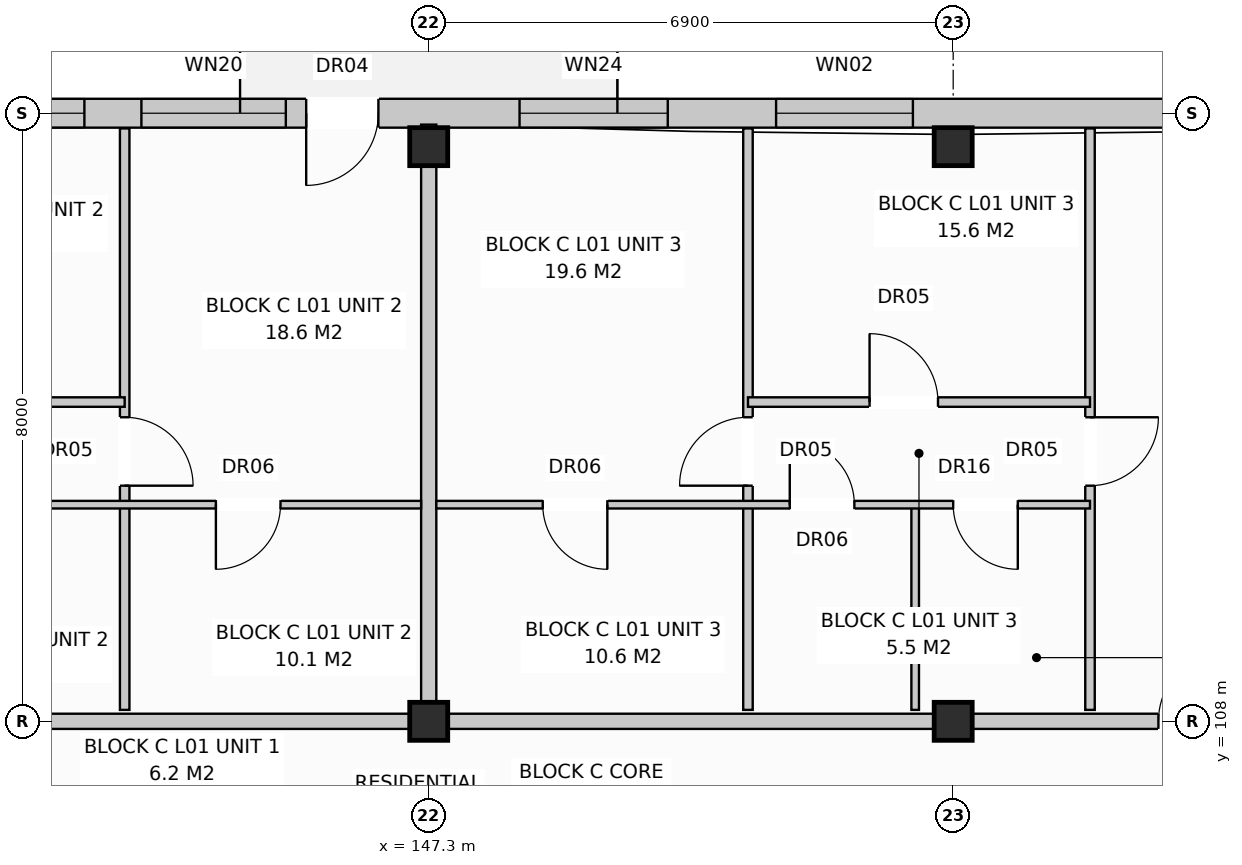
"""IFC4 building model, lengths in metres.
Left out: names, types, materials, properties, quantities, classifications, styles, units other than length and angle.
Written with IfcOpenShell. Run it as: python <this file> out.ifc"""

import sys

from ifc_helpers import new_model, si_unit, direction, frame, frame_2d, origin, origin_with_axes, origin_2d, place, context, subcontext, project, spatial, rectangle, extrude, element, fill, save


model = new_model("IFC4")
c1 = context("Model", 3, precision=1e-05, world=origin(), true_north=direction((0.0, 1.0)))
c2 = subcontext(c1, "Body", "Model", "MODEL_VIEW")
j1 = project(units=[si_unit("LENGTHUNIT", "METRE"), si_unit("PLANEANGLEUNIT", "RADIAN")], contexts=[c1])
p1 = place(None, origin())
s1 = spatial("IfcSite", under=j1, at=p1, CompositionType="ELEMENT")
p2 = place(p1, origin())
s2 = spatial("IfcBuilding", under=s1, at=p2, CompositionType="ELEMENT")
p3 = place(p2, frame((0.0, 0.0, 4.4)))
s3 = spatial("IfcBuildingStorey", under=s2, at=p3, CompositionType="ELEMENT", Elevation=4.4)
for number, where, z_axis, x_axis in (
    (1, (147.3, 108.0, 0.0), (0.0, 0.0, 1.0), (1.0, 0.0, 0.0)),
    (2, (147.3, 115.56, 0.0), (0.0, 0.0, 1.0), (1.0, 0.0, 0.0)),
    (3, (154.2, 108.0, 0.0), (0.0, 0.0, 1.0), (1.0, 0.0, 0.0)),
    (4, (154.2, 115.56, 0.0), (0.0, 0.0, 1.0), (1.0, 0.0, 0.0)),
):
    element("IfcColumn", number, at=place(p3, frame(where, z_axis=z_axis, x_axis=x_axis)), inside=s3, PredefinedType="COLUMN", context=c2, shape_type="SweptSolid", body=[
        extrude(rectangle(XDim=0.5, YDim=0.5, at=origin_2d()), origin(), (0.0, 0.0, 1.0), 3.6),
    ])
p4 = place(p3, frame((112.98, 116.0, 0.0), z_axis=(0.0, 0.0, 1.0), x_axis=(1.0, 0.0, 0.0)))
e5 = element("IfcWall", 5, at=p4, inside=s3, PredefinedType="STANDARD", context=c2, shape_type="SweptSolid", body=[
    extrude(rectangle(XDim=54.84, YDim=0.38, at=frame_2d((27.42, 0.0))), origin(), (0.0, 0.0, 1.0), 3.33),
])
p5 = place(p4, frame((7.39, 0.0, 0.0)))
e6 = element("IfcOpeningElement", 6, at=p5, cuts=e5, PredefinedType="OPENING", context=c2, shape_type="SweptSolid", body=[
    extrude(rectangle(XDim=0.95, YDim=2.1, at=frame_2d((0.475, 1.05))), frame((0.0, 0.202, 0.0), z_axis=(0.0, -1.0, 0.0), x_axis=(1.0, 0.0, 0.0)), (0.0, 0.0, 1.0), 0.404),
])
p6 = place(p4, frame((18.708, 0.0, 0.0)))
e7 = element("IfcOpeningElement", 7, at=p6, cuts=e5, PredefinedType="OPENING", context=c2, shape_type="SweptSolid", body=[
    extrude(rectangle(XDim=0.95, YDim=2.1, at=frame_2d((0.475, 1.05))), frame((0.0, 0.202, 0.0), z_axis=(0.0, -1.0, 0.0), x_axis=(1.0, 0.0, 0.0)), (0.0, 0.0, 1.0), 0.404),
])
p7 = place(p4, frame((32.708, 0.0, 0.0)))
e8 = element("IfcOpeningElement", 8, at=p7, cuts=e5, PredefinedType="OPENING", context=c2, shape_type="SweptSolid", body=[
    extrude(rectangle(XDim=0.95, YDim=2.1, at=frame_2d((0.475, 1.05))), frame((0.0, 0.202, 0.0), z_axis=(0.0, -1.0, 0.0), x_axis=(1.0, 0.0, 0.0)), (0.0, 0.0, 1.0), 0.404),
])
p8 = place(p4, frame((46.508, 0.0, 0.0)))
e9 = element("IfcOpeningElement", 9, at=p8, cuts=e5, PredefinedType="OPENING", context=c2, shape_type="SweptSolid", body=[
    extrude(rectangle(XDim=0.95, YDim=2.1, at=frame_2d((0.475, 1.05))), frame((0.0, 0.202, 0.0), z_axis=(0.0, -1.0, 0.0), x_axis=(1.0, 0.0, 0.0)), (0.0, 0.0, 1.0), 0.404),
])
p9 = place(p4, frame((1.515, 0.0, 0.8)))
e10 = element("IfcOpeningElement", 10, at=p9, cuts=e5, PredefinedType="OPENING", context=c2, shape_type="SweptSolid", body=[
    extrude(rectangle(XDim=1.95, YDim=1.65, at=frame_2d((0.975, 0.825))), frame((0.0, 0.202, 0.0), z_axis=(0.0, -1.0, 0.0), x_axis=(1.0, 0.0, 0.0)), (0.0, 0.0, 1.0), 0.404),
])
p10 = place(p4, frame((10.49, 0.0, 0.8)))
e11 = element("IfcOpeningElement", 11, at=p10, cuts=e5, PredefinedType="OPENING", context=c2, shape_type="SweptSolid", body=[
    extrude(rectangle(XDim=1.8, YDim=1.7, at=frame_2d((0.9, 0.85))), frame((0.0, 0.202, 0.0), z_axis=(0.0, -1.0, 0.0), x_axis=(1.0, 0.0, 0.0)), (0.0, 0.0, 1.0), 0.404),
])
p11 = place(p4, frame((15.84, 0.0, 0.8)))
e12 = element("IfcOpeningElement", 12, at=p11, cuts=e5, PredefinedType="OPENING", context=c2, shape_type="SweptSolid", body=[
    extrude(rectangle(XDim=1.9, YDim=1.85, at=frame_2d((0.95, 0.925))), frame((0.0, 0.202, 0.0), z_axis=(0.0, -1.0, 0.0), x_axis=(1.0, 0.0, 0.0)), (0.0, 0.0, 1.0), 0.404),
])
p12 = place(p4, frame((21.515, 0.0, 0.8)))
e13 = element("IfcOpeningElement", 13, at=p12, cuts=e5, PredefinedType="OPENING", context=c2, shape_type="SweptSolid", body=[
    extrude(rectangle(XDim=1.95, YDim=1.65, at=frame_2d((0.975, 0.825))), frame((0.0, 0.202, 0.0), z_axis=(0.0, -1.0, 0.0), x_axis=(1.0, 0.0, 0.0)), (0.0, 0.0, 1.0), 0.404),
])
p13 = place(p4, frame((27.99, 0.0, 0.8)))
e14 = element("IfcOpeningElement", 14, at=p13, cuts=e5, PredefinedType="OPENING", context=c2, shape_type="SweptSolid", body=[
    extrude(rectangle(XDim=1.8, YDim=1.7, at=frame_2d((0.9, 0.85))), frame((0.0, 0.202, 0.0), z_axis=(0.0, -1.0, 0.0), x_axis=(1.0, 0.0, 0.0)), (0.0, 0.0, 1.0), 0.404),
])
p14 = place(p4, frame((30.54, 0.0, 0.8)))
e15 = element("IfcOpeningElement", 15, at=p14, cuts=e5, PredefinedType="OPENING", context=c2, shape_type="SweptSolid", body=[
    extrude(rectangle(XDim=1.9, YDim=1.85, at=frame_2d((0.95, 0.925))), frame((0.0, 0.202, 0.0), z_axis=(0.0, -1.0, 0.0), x_axis=(1.0, 0.0, 0.0)), (0.0, 0.0, 1.0), 0.404),
])
p15 = place(p4, frame((35.515, 0.0, 0.8)))
e16 = element("IfcOpeningElement", 16, at=p15, cuts=e5, PredefinedType="OPENING", context=c2, shape_type="SweptSolid", body=[
    extrude(rectangle(XDim=1.95, YDim=1.65, at=frame_2d((0.975, 0.825))), frame((0.0, 0.202, 0.0), z_axis=(0.0, -1.0, 0.0), x_axis=(1.0, 0.0, 0.0)), (0.0, 0.0, 1.0), 0.404),
])
p16 = place(p4, frame((38.89, 0.0, 0.8)))
e17 = element("IfcOpeningElement", 17, at=p16, cuts=e5, PredefinedType="OPENING", context=c2, shape_type="SweptSolid", body=[
    extrude(rectangle(XDim=1.8, YDim=1.7, at=frame_2d((0.9, 0.85))), frame((0.0, 0.202, 0.0), z_axis=(0.0, -1.0, 0.0), x_axis=(1.0, 0.0, 0.0)), (0.0, 0.0, 1.0), 0.404),
])
p17 = place(p4, frame((44.34, 0.0, 0.8)))
e18 = element("IfcOpeningElement", 18, at=p17, cuts=e5, PredefinedType="OPENING", context=c2, shape_type="SweptSolid", body=[
    extrude(rectangle(XDim=1.9, YDim=1.85, at=frame_2d((0.95, 0.925))), frame((0.0, 0.202, 0.0), z_axis=(0.0, -1.0, 0.0), x_axis=(1.0, 0.0, 0.0)), (0.0, 0.0, 1.0), 0.404),
])
p18 = place(p4, frame((49.115, 0.0, 0.8)))
e19 = element("IfcOpeningElement", 19, at=p18, cuts=e5, PredefinedType="OPENING", context=c2, shape_type="SweptSolid", body=[
    extrude(rectangle(XDim=1.95, YDim=1.65, at=frame_2d((0.975, 0.825))), frame((0.0, 0.202, 0.0), z_axis=(0.0, -1.0, 0.0), x_axis=(1.0, 0.0, 0.0)), (0.0, 0.0, 1.0), 0.404),
])
p19 = place(p4, frame((52.405, 0.0, 0.8)))
e20 = element("IfcOpeningElement", 20, at=p19, cuts=e5, PredefinedType="OPENING", context=c2, shape_type="SweptSolid", body=[
    extrude(rectangle(XDim=1.8, YDim=1.7, at=frame_2d((0.9, 0.85))), frame((0.0, 0.202, 0.0), z_axis=(0.0, -1.0, 0.0), x_axis=(1.0, 0.0, 0.0)), (0.0, 0.0, 1.0), 0.404),
])
p20 = place(p3, frame((147.3, 108.15, 0.0), z_axis=(0.0, 0.0, 1.0), x_axis=(0.0, 1.0, 0.0)))
e21 = element("IfcWall", 21, at=p20, inside=s3, PredefinedType="PARTITIONING", context=c2, shape_type="SweptSolid", body=[
    extrude(rectangle(XDim=7.7, YDim=0.2, at=frame_2d((3.85, 0.0))), origin(), (0.0, 0.0, 1.0), 3.33),
])
p21 = place(p3, frame((126.6, 108.0, 0.0), z_axis=(0.0, 0.0, 1.0), x_axis=(1.0, 0.0, 0.0)))
e22 = element("IfcWall", 22, at=p21, inside=s3, PredefinedType="PARTITIONING", context=c2, shape_type="SweptSolid", body=[
    extrude(rectangle(XDim=20.7, YDim=0.2, at=frame_2d((10.35, 0.0))), origin(), (0.0, 0.0, 1.0), 2.77),
])
p22 = place(p21, frame((2.4, 0.0, 0.0)))
e23 = element("IfcOpeningElement", 23, at=p22, cuts=e22, PredefinedType="OPENING", context=c2, shape_type="SweptSolid", body=[
    extrude(rectangle(XDim=0.95, YDim=2.15, at=frame_2d((0.475, 1.075))), frame((0.0, 0.112, 0.0), z_axis=(0.0, -1.0, 0.0), x_axis=(1.0, 0.0, 0.0)), (0.0, 0.0, 1.0), 0.224),
])
p23 = place(p3, frame((143.3, 108.15, 0.0), z_axis=(0.0, 0.0, 1.0), x_axis=(0.0, 1.0, 0.0)))
e24 = element("IfcWall", 24, at=p23, inside=s3, PredefinedType="PARTITIONING", context=c2, shape_type="SweptSolid", body=[
    extrude(rectangle(XDim=7.65, YDim=0.125, at=frame_2d((3.825, 0.0))), origin(), (0.0, 0.0, 1.0), 2.99),
])
p24 = place(p23, frame((2.95, 0.0, 0.0)))
e25 = element("IfcOpeningElement", 25, at=p24, cuts=e24, PredefinedType="OPENING", context=c2, shape_type="SweptSolid", body=[
    extrude(rectangle(XDim=0.9, YDim=2.1, at=frame_2d((0.45, 1.05))), frame((0.0, 0.074, 0.0), z_axis=(0.0, -1.0, 0.0), x_axis=(1.0, 0.0, 0.0)), (0.0, 0.0, 1.0), 0.149),
])
p25 = place(p3, frame((132.9, 110.85, 0.0), z_axis=(0.0, 0.0, 1.0), x_axis=(1.0, 0.0, 0.0)))
e26 = element("IfcWall", 26, at=p25, inside=s3, PredefinedType="PARTITIONING", context=c2, shape_type="SweptSolid", body=[
    extrude(rectangle(XDim=14.3, YDim=0.1, at=frame_2d((7.15, 0.0))), origin(), (0.0, 0.0, 1.0), 3.33),
])
p26 = place(p25, frame((1.6, 0.0, 0.0)))
e27 = element("IfcOpeningElement", 27, at=p26, cuts=e26, PredefinedType="OPENING", context=c2, shape_type="SweptSolid", body=[
    extrude(rectangle(XDim=0.9, YDim=2.1, at=frame_2d((0.45, 1.05))), frame((0.0, 0.062, 0.0), z_axis=(0.0, -1.0, 0.0), x_axis=(1.0, 0.0, 0.0)), (0.0, 0.0, 1.0), 0.124),
])
p27 = place(p25, frame((5.1, 0.0, 0.0)))
e28 = element("IfcOpeningElement", 28, at=p27, cuts=e26, PredefinedType="OPENING", context=c2, shape_type="SweptSolid", body=[
    extrude(rectangle(XDim=0.85, YDim=2.05, at=frame_2d((0.425, 1.025))), frame((0.0, 0.062, 0.0), z_axis=(0.0, -1.0, 0.0), x_axis=(1.0, 0.0, 0.0)), (0.0, 0.0, 1.0), 0.124),
])
p28 = place(p25, frame((8.2, 0.0, 0.0)))
e29 = element("IfcOpeningElement", 29, at=p28, cuts=e26, PredefinedType="OPENING", context=c2, shape_type="SweptSolid", body=[
    extrude(rectangle(XDim=0.85, YDim=2.05, at=frame_2d((0.425, 1.025))), frame((0.0, 0.062, 0.0), z_axis=(0.0, -1.0, 0.0), x_axis=(1.0, 0.0, 0.0)), (0.0, 0.0, 1.0), 0.124),
])
p29 = place(p25, frame((11.6, 0.0, 0.0)))
e30 = element("IfcOpeningElement", 30, at=p29, cuts=e26, PredefinedType="OPENING", context=c2, shape_type="SweptSolid", body=[
    extrude(rectangle(XDim=0.85, YDim=2.05, at=frame_2d((0.425, 1.025))), frame((0.0, 0.062, 0.0), z_axis=(0.0, -1.0, 0.0), x_axis=(1.0, 0.0, 0.0)), (0.0, 0.0, 1.0), 0.124),
])
p30 = place(p3, frame((132.9, 112.2, 0.0), z_axis=(0.0, 0.0, 1.0), x_axis=(1.0, 0.0, 0.0)))
e31 = element("IfcWall", 31, at=p30, inside=s3, PredefinedType="PARTITIONING", context=c2, shape_type="SweptSolid", body=[
    extrude(rectangle(XDim=10.4, YDim=0.125, at=frame_2d((5.2, 0.0))), origin(), (0.0, 0.0, 1.0), 3.33),
])
p31 = place(p30, frame((2.0, 0.0, 0.0)))
e32 = element("IfcOpeningElement", 32, at=p31, cuts=e31, PredefinedType="OPENING", context=c2, shape_type="SweptSolid", body=[
    extrude(rectangle(XDim=0.9, YDim=2.1, at=frame_2d((0.45, 1.05))), frame((0.0, 0.074, 0.0), z_axis=(0.0, -1.0, 0.0), x_axis=(1.0, 0.0, 0.0)), (0.0, 0.0, 1.0), 0.149),
])
p32 = place(p30, frame((7.2, 0.0, 0.0)))
e33 = element("IfcOpeningElement", 33, at=p32, cuts=e31, PredefinedType="OPENING", context=c2, shape_type="SweptSolid", body=[
    extrude(rectangle(XDim=0.9, YDim=2.1, at=frame_2d((0.45, 1.05))), frame((0.0, 0.074, 0.0), z_axis=(0.0, -1.0, 0.0), x_axis=(1.0, 0.0, 0.0)), (0.0, 0.0, 1.0), 0.149),
])
p33 = place(p3, frame((147.3, 108.0, 0.0), z_axis=(0.0, 0.0, 1.0), x_axis=(1.0, 0.0, 0.0)))
e34 = element("IfcWall", 34, at=p33, inside=s3, PredefinedType="PARTITIONING", context=c2, shape_type="SweptSolid", body=[
    extrude(rectangle(XDim=13.8, YDim=0.2, at=frame_2d((6.9, 0.0))), origin(), (0.0, 0.0, 1.0), 2.77),
])
p34 = place(p33, frame((9.6, 0.0, 0.0)))
e35 = element("IfcOpeningElement", 35, at=p34, cuts=e34, PredefinedType="OPENING", context=c2, shape_type="SweptSolid", body=[
    extrude(rectangle(XDim=0.95, YDim=2.15, at=frame_2d((0.475, 1.075))), frame((0.0, 0.112, 0.0), z_axis=(0.0, -1.0, 0.0), x_axis=(1.0, 0.0, 0.0)), (0.0, 0.0, 1.0), 0.224),
])
p35 = place(p3, frame((156.0, 108.15, 0.0), z_axis=(0.0, 0.0, 1.0), x_axis=(0.0, 1.0, 0.0)))
e36 = element("IfcWall", 36, at=p35, inside=s3, PredefinedType="PARTITIONING", context=c2, shape_type="SweptSolid", body=[
    extrude(rectangle(XDim=7.65, YDim=0.125, at=frame_2d((3.825, 0.0))), origin(), (0.0, 0.0, 1.0), 3.33),
])
p36 = place(p35, frame((2.95, 0.0, 0.0)))
e37 = element("IfcOpeningElement", 37, at=p36, cuts=e36, PredefinedType="OPENING", context=c2, shape_type="SweptSolid", body=[
    extrude(rectangle(XDim=0.9, YDim=2.1, at=frame_2d((0.45, 1.05))), frame((0.0, 0.074, 0.0), z_axis=(0.0, -1.0, 0.0), x_axis=(1.0, 0.0, 0.0)), (0.0, 0.0, 1.0), 0.149),
])
p37 = place(p3, frame((151.5, 108.15, 0.0), z_axis=(0.0, 0.0, 1.0), x_axis=(0.0, 1.0, 0.0)))
e38 = element("IfcWall", 38, at=p37, inside=s3, PredefinedType="PARTITIONING", context=c2, shape_type="SweptSolid", body=[
    extrude(rectangle(XDim=7.65, YDim=0.125, at=frame_2d((3.825, 0.0))), origin(), (0.0, 0.0, 1.0), 2.99),
])
p38 = place(p37, frame((2.95, 0.0, 0.0)))
e39 = element("IfcOpeningElement", 39, at=p38, cuts=e38, PredefinedType="OPENING", context=c2, shape_type="SweptSolid", body=[
    extrude(rectangle(XDim=0.9, YDim=2.1, at=frame_2d((0.45, 1.05))), frame((0.0, 0.074, 0.0), z_axis=(0.0, -1.0, 0.0), x_axis=(1.0, 0.0, 0.0)), (0.0, 0.0, 1.0), 0.149),
])
p39 = place(p3, frame((153.7, 108.15, 0.0), z_axis=(0.0, 0.0, 1.0), x_axis=(0.0, 1.0, 0.0)))
e40 = element("IfcWall", 40, at=p39, inside=s3, PredefinedType="PARTITIONING", context=c2, shape_type="SweptSolid", body=[
    extrude(rectangle(XDim=2.7, YDim=0.1, at=frame_2d((1.35, 0.0))), origin(), (0.0, 0.0, 1.0), 3.33),
])
p40 = place(p3, frame((147.4, 110.85, 0.0), z_axis=(0.0, 0.0, 1.0), x_axis=(1.0, 0.0, 0.0)))
e41 = element("IfcWall", 41, at=p40, inside=s3, PredefinedType="PARTITIONING", context=c2, shape_type="SweptSolid", body=[
    extrude(rectangle(XDim=8.6, YDim=0.1, at=frame_2d((4.3, 0.0))), origin(), (0.0, 0.0, 1.0), 3.33),
])
p41 = place(p40, frame((1.4, 0.0, 0.0)))
e42 = element("IfcOpeningElement", 42, at=p41, cuts=e41, PredefinedType="OPENING", context=c2, shape_type="SweptSolid", body=[
    extrude(rectangle(XDim=0.85, YDim=2.05, at=frame_2d((0.425, 1.025))), frame((0.0, 0.062, 0.0), z_axis=(0.0, -1.0, 0.0), x_axis=(1.0, 0.0, 0.0)), (0.0, 0.0, 1.0), 0.124),
])
p42 = place(p40, frame((4.65, 0.0, 0.0)))
e43 = element("IfcOpeningElement", 43, at=p42, cuts=e41, PredefinedType="OPENING", context=c2, shape_type="SweptSolid", body=[
    extrude(rectangle(XDim=0.85, YDim=2.05, at=frame_2d((0.425, 1.025))), frame((0.0, 0.062, 0.0), z_axis=(0.0, -1.0, 0.0), x_axis=(1.0, 0.0, 0.0)), (0.0, 0.0, 1.0), 0.124),
])
p43 = place(p40, frame((6.8, 0.0, 0.0)))
e44 = element("IfcOpeningElement", 44, at=p43, cuts=e41, PredefinedType="OPENING", context=c2, shape_type="SweptSolid", body=[
    extrude(rectangle(XDim=0.85, YDim=2.1, at=frame_2d((0.425, 1.05))), frame((0.0, 0.062, 0.0), z_axis=(0.0, -1.0, 0.0), x_axis=(1.0, 0.0, 0.0)), (0.0, 0.0, 1.0), 0.124),
])
p44 = place(p3, frame((151.5, 112.2, 0.0), z_axis=(0.0, 0.0, 1.0), x_axis=(1.0, 0.0, 0.0)))
e45 = element("IfcWall", 45, at=p44, inside=s3, PredefinedType="PARTITIONING", context=c2, shape_type="SweptSolid", body=[
    extrude(rectangle(XDim=4.5, YDim=0.125, at=frame_2d((2.25, 0.0))), origin(), (0.0, 0.0, 1.0), 3.33),
])
p45 = place(p44, frame((1.6, 0.0, 0.0)))
e46 = element("IfcOpeningElement", 46, at=p45, cuts=e45, PredefinedType="OPENING", context=c2, shape_type="SweptSolid", body=[
    extrude(rectangle(XDim=0.9, YDim=2.1, at=frame_2d((0.45, 1.05))), frame((0.0, 0.074, 0.0), z_axis=(0.0, -1.0, 0.0), x_axis=(1.0, 0.0, 0.0)), (0.0, 0.0, 1.0), 0.149),
])
p46 = place(p7, frame((0.95, 0.0, 0.0), z_axis=(0.0, 0.0, 1.0), x_axis=(-1.0, 0.0, 0.0)))
e47 = element("IfcDoor", 47, at=p46, inside=s3, OperationType="SINGLE_SWING_LEFT", PredefinedType="DOOR", context=c2, shape_type="SweptSolid", body=[
    extrude(rectangle(XDim=0.95, YDim=2.1, at=frame_2d((0.475, 1.05))), frame((0.0, 0.025, 0.0), z_axis=(0.0, -1.0, 0.0), x_axis=(1.0, 0.0, 0.0)), (0.0, 0.0, 1.0), 0.05),
])
fill(e8, e47)
p47 = place(p13, origin_with_axes())
e48 = element("IfcWindow", 48, at=p47, inside=s3, PartitioningType="SINGLE_PANEL", PredefinedType="WINDOW", context=c2, shape_type="SweptSolid", body=[
    extrude(rectangle(XDim=1.8, YDim=1.7, at=frame_2d((0.9, 0.85))), frame((0.0, 0.03, 0.0), z_axis=(0.0, -1.0, 0.0), x_axis=(1.0, 0.0, 0.0)), (0.0, 0.0, 1.0), 0.06),
])
fill(e14, e48)
p48 = place(p14, origin_with_axes())
e49 = element("IfcWindow", 49, at=p48, inside=s3, PartitioningType="SINGLE_PANEL", PredefinedType="WINDOW", context=c2, shape_type="SweptSolid", body=[
    extrude(rectangle(XDim=1.9, YDim=1.85, at=frame_2d((0.95, 0.925))), frame((0.0, 0.03, 0.0), z_axis=(0.0, -1.0, 0.0), x_axis=(1.0, 0.0, 0.0)), (0.0, 0.0, 1.0), 0.06),
])
fill(e15, e49)
p49 = place(p15, origin_with_axes())
e50 = element("IfcWindow", 50, at=p49, inside=s3, PartitioningType="SINGLE_PANEL", PredefinedType="WINDOW", context=c2, shape_type="SweptSolid", body=[
    extrude(rectangle(XDim=1.95, YDim=1.65, at=frame_2d((0.975, 0.825))), frame((0.0, 0.03, 0.0), z_axis=(0.0, -1.0, 0.0), x_axis=(1.0, 0.0, 0.0)), (0.0, 0.0, 1.0), 0.06),
])
fill(e16, e50)
p50 = place(p16, origin_with_axes())
e51 = element("IfcWindow", 51, at=p50, inside=s3, PartitioningType="SINGLE_PANEL", PredefinedType="WINDOW", context=c2, shape_type="SweptSolid", body=[
    extrude(rectangle(XDim=1.8, YDim=1.7, at=frame_2d((0.9, 0.85))), frame((0.0, 0.03, 0.0), z_axis=(0.0, -1.0, 0.0), x_axis=(1.0, 0.0, 0.0)), (0.0, 0.0, 1.0), 0.06),
])
fill(e17, e51)
p51 = place(p24, frame((0.9, 0.0, 0.0), z_axis=(0.0, 0.0, 1.0), x_axis=(-1.0, 0.0, 0.0)))
e52 = element("IfcDoor", 52, at=p51, inside=s3, OperationType="SINGLE_SWING_LEFT", PredefinedType="DOOR", context=c2, shape_type="SweptSolid", body=[
    extrude(rectangle(XDim=0.9, YDim=2.1, at=frame_2d((0.45, 1.05))), frame((0.0, 0.025, 0.0), z_axis=(0.0, -1.0, 0.0), x_axis=(1.0, 0.0, 0.0)), (0.0, 0.0, 1.0), 0.05),
])
fill(e25, e52)
p52 = place(p29, frame((0.85, 0.0, 0.0), z_axis=(0.0, 0.0, 1.0), x_axis=(-1.0, 0.0, 0.0)))
e53 = element("IfcDoor", 53, at=p52, inside=s3, OperationType="SINGLE_SWING_LEFT", PredefinedType="DOOR", context=c2, shape_type="SweptSolid", body=[
    extrude(rectangle(XDim=0.85, YDim=2.05, at=frame_2d((0.425, 1.025))), frame((0.0, 0.025, 0.0), z_axis=(0.0, -1.0, 0.0), x_axis=(1.0, 0.0, 0.0)), (0.0, 0.0, 1.0), 0.05),
])
fill(e30, e53)
p53 = place(p34, origin_with_axes())
e54 = element("IfcDoor", 54, at=p53, inside=s3, OperationType="SINGLE_SWING_RIGHT", PredefinedType="DOOR", context=c2, shape_type="SweptSolid", body=[
    extrude(rectangle(XDim=0.95, YDim=2.15, at=frame_2d((0.475, 1.075))), frame((0.0, 0.025, 0.0), z_axis=(0.0, -1.0, 0.0), x_axis=(1.0, 0.0, 0.0)), (0.0, 0.0, 1.0), 0.05),
])
fill(e35, e54)
p54 = place(p36, frame((0.9, 0.0, 0.0), z_axis=(0.0, 0.0, 1.0), x_axis=(-1.0, 0.0, 0.0)))
e55 = element("IfcDoor", 55, at=p54, inside=s3, OperationType="SINGLE_SWING_RIGHT", PredefinedType="DOOR", context=c2, shape_type="SweptSolid", body=[
    extrude(rectangle(XDim=0.9, YDim=2.1, at=frame_2d((0.45, 1.05))), frame((0.0, 0.025, 0.0), z_axis=(0.0, -1.0, 0.0), x_axis=(1.0, 0.0, 0.0)), (0.0, 0.0, 1.0), 0.05),
])
fill(e37, e55)
p55 = place(p38, origin_with_axes())
e56 = element("IfcDoor", 56, at=p55, inside=s3, OperationType="SINGLE_SWING_LEFT", PredefinedType="DOOR", context=c2, shape_type="SweptSolid", body=[
    extrude(rectangle(XDim=0.9, YDim=2.1, at=frame_2d((0.45, 1.05))), frame((0.0, 0.025, 0.0), z_axis=(0.0, -1.0, 0.0), x_axis=(1.0, 0.0, 0.0)), (0.0, 0.0, 1.0), 0.05),
])
fill(e39, e56)
p56 = place(p41, frame((0.85, 0.0, 0.0), z_axis=(0.0, 0.0, 1.0), x_axis=(-1.0, 0.0, 0.0)))
e57 = element("IfcDoor", 57, at=p56, inside=s3, OperationType="SINGLE_SWING_RIGHT", PredefinedType="DOOR", context=c2, shape_type="SweptSolid", body=[
    extrude(rectangle(XDim=0.85, YDim=2.05, at=frame_2d((0.425, 1.025))), frame((0.0, 0.025, 0.0), z_axis=(0.0, -1.0, 0.0), x_axis=(1.0, 0.0, 0.0)), (0.0, 0.0, 1.0), 0.05),
])
fill(e42, e57)
p57 = place(p42, origin_with_axes())
e58 = element("IfcDoor", 58, at=p57, inside=s3, OperationType="SINGLE_SWING_LEFT", PredefinedType="DOOR", context=c2, shape_type="SweptSolid", body=[
    extrude(rectangle(XDim=0.85, YDim=2.05, at=frame_2d((0.425, 1.025))), frame((0.0, 0.025, 0.0), z_axis=(0.0, -1.0, 0.0), x_axis=(1.0, 0.0, 0.0)), (0.0, 0.0, 1.0), 0.05),
])
fill(e43, e58)
p58 = place(p43, frame((0.85, 0.0, 0.0), z_axis=(0.0, 0.0, 1.0), x_axis=(-1.0, 0.0, 0.0)))
e59 = element("IfcDoor", 59, at=p58, inside=s3, OperationType="SINGLE_SWING_RIGHT", PredefinedType="DOOR", context=c2, shape_type="SweptSolid", body=[
    extrude(rectangle(XDim=0.85, YDim=2.1, at=frame_2d((0.425, 1.05))), frame((0.0, 0.025, 0.0), z_axis=(0.0, -1.0, 0.0), x_axis=(1.0, 0.0, 0.0)), (0.0, 0.0, 1.0), 0.05),
])
fill(e44, e59)
p59 = place(p45, origin_with_axes())
e60 = element("IfcDoor", 60, at=p59, inside=s3, OperationType="SINGLE_SWING_LEFT", PredefinedType="DOOR", context=c2, shape_type="SweptSolid", body=[
    extrude(rectangle(XDim=0.9, YDim=2.1, at=frame_2d((0.45, 1.05))), frame((0.0, 0.025, 0.0), z_axis=(0.0, -1.0, 0.0), x_axis=(1.0, 0.0, 0.0)), (0.0, 0.0, 1.0), 0.05),
])
fill(e46, e60)
save(model, sys.argv[1])
